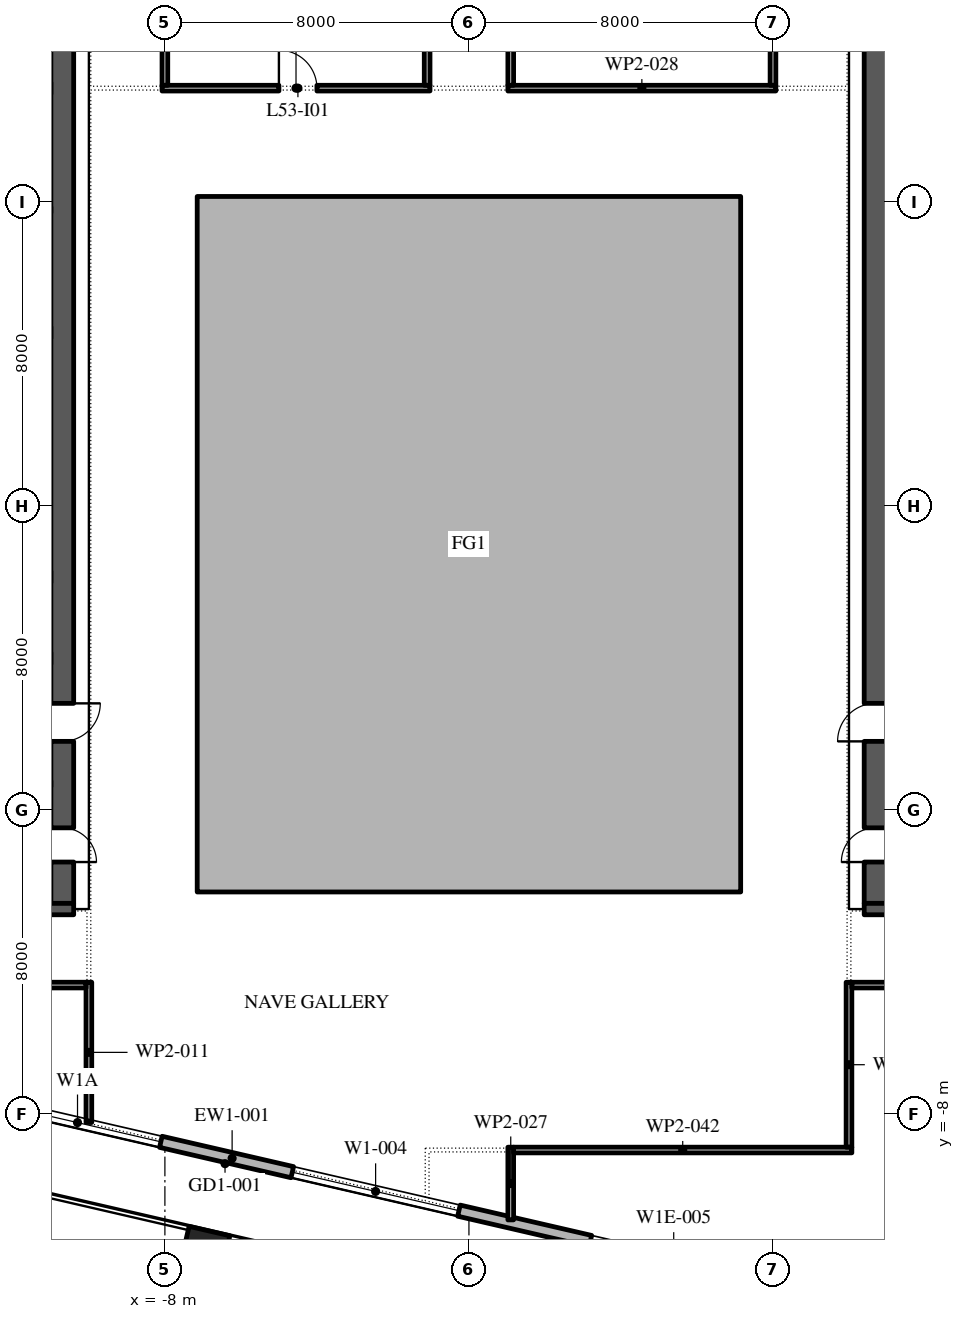
"""IFC4 building model, lengths in metres.
Left out: names, types, materials, properties, quantities, classifications, styles, units other than length and angle.
Written with IfcOpenShell. Run it as: python <this file> out.ifc"""

import sys

from ifc_helpers import new_model, si_unit, direction, frame, frame_2d, origin, origin_2d, place, context, subcontext, project, spatial, polyline, rectangle, outline, extrude, element, fill, save


model = new_model("IFC4")
c1 = context("Model", 3, precision=1e-05, world=origin(), true_north=direction((0.0, 1.0)))
c2 = subcontext(c1, "Body", "Model", "MODEL_VIEW")
j1 = project(units=[si_unit("LENGTHUNIT", "METRE"), si_unit("PLANEANGLEUNIT", "RADIAN")], contexts=[c1])
p1 = place(None, origin())
s1 = spatial("IfcSite", under=j1, at=p1, CompositionType="ELEMENT")
p2 = place(p1, origin())
s2 = spatial("IfcBuilding", under=s1, at=p2, CompositionType="ELEMENT")
p3 = place(p2, frame((0.0, 0.0, 247.2)))
s3 = spatial("IfcBuildingStorey", under=s2, at=p3, CompositionType="ELEMENT", Elevation=247.2)
p4 = place(p3, frame((-6.951, -11.608, 0.0), z_axis=(0.0, 0.0, 1.0), x_axis=(0.974370064785, -0.224951054344, 0.0)))
e1 = element("IfcColumn", 1, at=p4, inside=s3, PredefinedType="COLUMN", context=c2, shape_type="SweptSolid", body=[
    extrude(rectangle(XDim=1.1, YDim=1.1, at=origin_2d()), origin(), (0.0, 0.0, 1.0), 4.2),
])
p5 = place(p3, origin())
e2 = element("IfcWall", 2, at=p5, inside=s3, PredefinedType="STANDARD", context=c2, shape_type="SweptSolid", body=[
    extrude(outline(polyline([(-7.15, -2.15), (7.15, -2.15), (7.15, 16.15), (-7.15, 16.15), (-7.15, -2.15)]), holes=[polyline([(-7.0, -2.0), (-7.0, 16.0), (7.0, 16.0), (7.0, -2.0), (-7.0, -2.0)])]), origin(), (0.0, 0.0, 1.0), 4.0),
])
p6 = place(p3, frame((-29.616, -3.758, 0.0), z_axis=(0.0, 0.0, 1.0), x_axis=(0.974370532314, -0.224949029246, 0.0)))
e3 = element("IfcWall", 3, at=p6, inside=s3, PredefinedType="STANDARD", context=c2, shape_type="SweptSolid", body=[
    extrude(rectangle(XDim=48.0, YDim=0.3, at=frame_2d((24.0, 0.0))), origin(), (0.0, 0.0, 1.0), 4.0),
])
p7 = place(p6, frame((1.625, 0.0, 0.45)))
e4 = element("IfcOpeningElement", 4, at=p7, cuts=e3, PredefinedType="OPENING", context=c2, shape_type="SweptSolid", body=[
    extrude(rectangle(XDim=4.5, YDim=3.05, at=frame_2d((2.25, 1.525))), frame((0.0, 0.16, 0.0), z_axis=(0.0, -1.0, 0.0), x_axis=(1.0, 0.0, 0.0)), (0.0, 0.0, 1.0), 0.32),
])
p8 = place(p6, frame((10.575, 0.0, 0.0)))
e5 = element("IfcOpeningElement", 5, at=p8, cuts=e3, PredefinedType="OPENING", context=c2, shape_type="SweptSolid", body=[
    extrude(rectangle(XDim=2.4, YDim=3.5, at=frame_2d((1.2, 1.75))), frame((0.0, 0.16, 0.0), z_axis=(0.0, -1.0, 0.0), x_axis=(1.0, 0.0, 0.0)), (0.0, 0.0, 1.0), 0.32),
])
p9 = place(p6, frame((17.575, 0.0, 0.45)))
e6 = element("IfcOpeningElement", 6, at=p9, cuts=e3, PredefinedType="OPENING", context=c2, shape_type="SweptSolid", body=[
    extrude(rectangle(XDim=4.5, YDim=3.0, at=frame_2d((2.25, 1.5))), frame((0.0, 0.16, 0.0), z_axis=(0.0, -1.0, 0.0), x_axis=(1.0, 0.0, 0.0)), (0.0, 0.0, 1.0), 0.32),
])
p10 = place(p6, frame((25.625, 0.0, 0.45)))
e7 = element("IfcOpeningElement", 7, at=p10, cuts=e3, PredefinedType="OPENING", context=c2, shape_type="SweptSolid", body=[
    extrude(rectangle(XDim=4.5, YDim=3.05, at=frame_2d((2.25, 1.525))), frame((0.0, 0.16, 0.0), z_axis=(0.0, -1.0, 0.0), x_axis=(1.0, 0.0, 0.0)), (0.0, 0.0, 1.0), 0.32),
])
p11 = place(p6, frame((33.675, 0.0, 0.45)))
e8 = element("IfcOpeningElement", 8, at=p11, cuts=e3, PredefinedType="OPENING", context=c2, shape_type="SweptSolid", body=[
    extrude(rectangle(XDim=4.5, YDim=2.825, at=frame_2d((2.25, 1.413))), frame((0.0, 0.16, 0.0), z_axis=(0.0, -1.0, 0.0), x_axis=(1.0, 0.0, 0.0)), (0.0, 0.0, 1.0), 0.32),
])
p12 = place(p6, frame((42.775, 0.0, 0.0)))
e9 = element("IfcOpeningElement", 9, at=p12, cuts=e3, PredefinedType="OPENING", context=c2, shape_type="SweptSolid", body=[
    extrude(rectangle(XDim=2.4, YDim=3.5, at=frame_2d((1.2, 1.75))), frame((0.0, 0.16, 0.0), z_axis=(0.0, -1.0, 0.0), x_axis=(1.0, 0.0, 0.0)), (0.0, 0.0, 1.0), 0.32),
])
p13 = place(p3, frame((-10.7, -2.45, 0.0), z_axis=(0.0, 0.0, 1.0), x_axis=(0.0, 1.0, 0.0)))
e10 = element("IfcWall", 10, at=p13, inside=s3, PredefinedType="SHEAR", context=c2, shape_type="SweptSolid", body=[
    extrude(rectangle(XDim=27.9, YDim=0.6, at=frame_2d((13.95, 0.0))), origin(), (0.0, 0.0, 1.0), 4.0),
])
p14 = place(p13, frame((23.65, 0.0, 0.0)))
e11 = element("IfcOpeningElement", 11, at=p14, cuts=e10, PredefinedType="OPENING", context=c2, shape_type="SweptSolid", body=[
    extrude(rectangle(XDim=2.4, YDim=2.1, at=frame_2d((1.2, 1.05))), frame((0.0, 0.31, 0.0), z_axis=(0.0, -1.0, 0.0), x_axis=(1.0, 0.0, 0.0)), (0.0, 0.0, 1.0), 0.62),
])
p15 = place(p13, frame((1.087, 0.0, 0.0)))
e12 = element("IfcOpeningElement", 12, at=p15, cuts=e10, PredefinedType="OPENING", context=c2, shape_type="SweptSolid", body=[
    extrude(rectangle(XDim=0.9, YDim=2.1, at=frame_2d((0.45, 1.05))), frame((0.0, 0.31, 0.0), z_axis=(0.0, -1.0, 0.0), x_axis=(1.0, 0.0, 0.0)), (0.0, 0.0, 1.0), 0.62),
])
p16 = place(p13, frame((4.262, 0.0, 0.0)))
e13 = element("IfcOpeningElement", 13, at=p16, cuts=e10, PredefinedType="OPENING", context=c2, shape_type="SweptSolid", body=[
    extrude(rectangle(XDim=1.0, YDim=2.1, at=frame_2d((0.5, 1.05))), frame((0.0, 0.31, 0.0), z_axis=(0.0, -1.0, 0.0), x_axis=(1.0, 0.0, 0.0)), (0.0, 0.0, 1.0), 0.62),
])
p17 = place(p3, frame((-21.6, -2.6, 0.0), z_axis=(0.0, 0.0, 1.0), x_axis=(1.0, 0.0, 0.0)))
e14 = element("IfcWall", 14, at=p17, inside=s3, PredefinedType="SHEAR", context=c2, shape_type="SweptSolid", body=[
    extrude(rectangle(XDim=11.2, YDim=0.3, at=frame_2d((5.6, 0.0))), origin(), (0.0, 0.0, 1.0), 4.0),
])
p18 = place(p3, frame((10.7, -2.45, 0.0), z_axis=(0.0, 0.0, 1.0), x_axis=(0.0, 1.0, 0.0)))
e15 = element("IfcWall", 15, at=p18, inside=s3, PredefinedType="SHEAR", context=c2, shape_type="SweptSolid", body=[
    extrude(rectangle(XDim=27.9, YDim=0.6, at=frame_2d((13.95, 0.0))), origin(), (0.0, 0.0, 1.0), 4.0),
])
p19 = place(p18, frame((23.65, 0.0, 0.0)))
e16 = element("IfcOpeningElement", 16, at=p19, cuts=e15, PredefinedType="OPENING", context=c2, shape_type="SweptSolid", body=[
    extrude(rectangle(XDim=2.4, YDim=2.1, at=frame_2d((1.2, 1.05))), frame((0.0, 0.31, 0.0), z_axis=(0.0, -1.0, 0.0), x_axis=(1.0, 0.0, 0.0)), (0.0, 0.0, 1.0), 0.62),
])
p20 = place(p18, frame((1.087, 0.0, 0.0)))
e17 = element("IfcOpeningElement", 17, at=p20, cuts=e15, PredefinedType="OPENING", context=c2, shape_type="SweptSolid", body=[
    extrude(rectangle(XDim=0.9, YDim=2.1, at=frame_2d((0.45, 1.05))), frame((0.0, 0.31, 0.0), z_axis=(0.0, -1.0, 0.0), x_axis=(1.0, 0.0, 0.0)), (0.0, 0.0, 1.0), 0.62),
])
p21 = place(p18, frame((4.262, 0.0, 0.0)))
e18 = element("IfcOpeningElement", 18, at=p21, cuts=e15, PredefinedType="OPENING", context=c2, shape_type="SweptSolid", body=[
    extrude(rectangle(XDim=1.0, YDim=2.1, at=frame_2d((0.5, 1.05))), frame((0.0, 0.31, 0.0), z_axis=(0.0, -1.0, 0.0), x_axis=(1.0, 0.0, 0.0)), (0.0, 0.0, 1.0), 0.62),
])
p22 = place(p3, frame((10.4, -2.6, 0.0), z_axis=(0.0, 0.0, 1.0), x_axis=(1.0, 0.0, 0.0)))
e19 = element("IfcWall", 19, at=p22, inside=s3, PredefinedType="SHEAR", context=c2, shape_type="SweptSolid", body=[
    extrude(rectangle(XDim=11.2, YDim=0.3, at=frame_2d((5.6, 0.0))), origin(), (0.0, 0.0, 1.0), 4.0),
])
p23 = place(p3, frame((-10.0, -8.216, 0.0), z_axis=(0.0, 0.0, 1.0), x_axis=(0.0, 1.0, 0.0)))
e20 = element("IfcWall", 20, at=p23, inside=s3, PredefinedType="PARTITIONING", context=c2, shape_type="SweptSolid", body=[
    extrude(rectangle(XDim=3.691, YDim=0.15, at=frame_2d((1.846, 0.0))), origin(), (0.0, 0.0, 1.0), 4.0),
])
p24 = place(p3, frame((-10.075, -4.6, 0.0), z_axis=(0.0, 0.0, 1.0), x_axis=(-1.0, 0.0, 0.0)))
e21 = element("IfcWall", 21, at=p24, inside=s3, PredefinedType="PARTITIONING", context=c2, shape_type="SweptSolid", body=[
    extrude(rectangle(XDim=11.86, YDim=0.15, at=frame_2d((5.93, 0.0))), origin(), (0.0, 0.0, 1.0), 4.0),
])
p25 = place(p3, frame((-8.075, 19.0, 0.0), z_axis=(0.0, 0.0, 1.0), x_axis=(1.0, 0.0, 0.0)))
e22 = element("IfcWall", 22, at=p25, inside=s3, PredefinedType="PARTITIONING", context=c2, shape_type="SweptSolid", body=[
    extrude(rectangle(XDim=7.05, YDim=0.15, at=frame_2d((3.525, 0.0))), origin(), (0.0, 0.0, 1.0), 4.0),
])
p26 = place(p25, frame((3.075, 0.0, 0.0)))
e23 = element("IfcOpeningElement", 23, at=p26, cuts=e22, PredefinedType="OPENING", context=c2, shape_type="SweptSolid", body=[
    extrude(rectangle(XDim=1.0, YDim=2.1, at=frame_2d((0.5, 1.05))), frame((0.0, 0.085, 0.0), z_axis=(0.0, -1.0, 0.0), x_axis=(1.0, 0.0, 0.0)), (0.0, 0.0, 1.0), 0.17),
])
p27 = place(p3, frame((-8.0, 25.0, 0.0), z_axis=(0.0, 0.0, 1.0), x_axis=(0.0, -1.0, 0.0)))
e24 = element("IfcWall", 24, at=p27, inside=s3, PredefinedType="PARTITIONING", context=c2, shape_type="SweptSolid", body=[
    extrude(rectangle(XDim=5.925, YDim=0.15, at=frame_2d((2.962, 0.0))), origin(), (0.0, 0.0, 1.0), 4.0),
])
p28 = place(p3, frame((-1.1, 19.075, 0.0), z_axis=(0.0, 0.0, 1.0), x_axis=(0.0, 1.0, 0.0)))
e25 = element("IfcWall", 25, at=p28, inside=s3, PredefinedType="PARTITIONING", context=c2, shape_type="SweptSolid", body=[
    extrude(rectangle(XDim=5.875, YDim=0.15, at=frame_2d((2.938, 0.0))), origin(), (0.0, 0.0, 1.0), 4.0),
])
p29 = place(p3, frame((1.1, -8.865, 0.0), z_axis=(0.0, 0.0, 1.0), x_axis=(0.0, -1.0, 0.0)))
e26 = element("IfcWall", 26, at=p29, inside=s3, PredefinedType="PARTITIONING", context=c2, shape_type="SweptSolid", body=[
    extrude(rectangle(XDim=1.913, YDim=0.15, at=frame_2d((0.957, 0.0))), origin(), (0.0, 0.0, 1.0), 4.0),
])
p30 = place(p3, frame((1.025, 19.0, 0.0), z_axis=(0.0, 0.0, 1.0), x_axis=(1.0, 0.0, 0.0)))
e27 = element("IfcWall", 27, at=p30, inside=s3, PredefinedType="PARTITIONING", context=c2, shape_type="SweptSolid", body=[
    extrude(rectangle(XDim=7.05, YDim=0.15, at=frame_2d((3.525, 0.0))), origin(), (0.0, 0.0, 1.0), 4.0),
])
p31 = place(p3, frame((1.1, 28.05, 0.0), z_axis=(0.0, 0.0, 1.0), x_axis=(0.0, -1.0, 0.0)))
e28 = element("IfcWall", 28, at=p31, inside=s3, PredefinedType="PARTITIONING", context=c2, shape_type="SweptSolid", body=[
    extrude(rectangle(XDim=8.975, YDim=0.15, at=frame_2d((4.488, 0.0))), origin(), (0.0, 0.0, 1.0), 4.0),
])
p32 = place(p3, frame((8.0, 19.075, 0.0), z_axis=(0.0, 0.0, 1.0), x_axis=(0.0, 1.0, 0.0)))
e29 = element("IfcWall", 29, at=p32, inside=s3, PredefinedType="PARTITIONING", context=c2, shape_type="SweptSolid", body=[
    extrude(rectangle(XDim=8.875, YDim=0.15, at=frame_2d((4.438, 0.0))), origin(), (0.0, 0.0, 1.0), 4.0),
])
p33 = place(p32, frame((4.775, 0.0, 0.0)))
e30 = element("IfcOpeningElement", 30, at=p33, cuts=e29, PredefinedType="OPENING", context=c2, shape_type="SweptSolid", body=[
    extrude(rectangle(XDim=1.0, YDim=2.1, at=frame_2d((0.5, 1.05))), frame((0.0, 0.085, 0.0), z_axis=(0.0, -1.0, 0.0), x_axis=(1.0, 0.0, 0.0)), (0.0, 0.0, 1.0), 0.17),
])
p34 = place(p3, frame((10.075, -8.94, 0.0), z_axis=(0.0, 0.0, 1.0), x_axis=(-1.0, 0.0, 0.0)))
e31 = element("IfcWall", 31, at=p34, inside=s3, PredefinedType="PARTITIONING", context=c2, shape_type="SweptSolid", body=[
    extrude(rectangle(XDim=8.9, YDim=0.15, at=frame_2d((4.45, 0.0))), origin(), (0.0, 0.0, 1.0), 4.0),
])
p35 = place(p3, frame((10.0, -4.525, 0.0), z_axis=(0.0, 0.0, 1.0), x_axis=(0.0, -1.0, 0.0)))
e32 = element("IfcWall", 32, at=p35, inside=s3, PredefinedType="PARTITIONING", context=c2, shape_type="SweptSolid", body=[
    extrude(rectangle(XDim=4.34, YDim=0.15, at=frame_2d((2.17, 0.0))), origin(), (0.0, 0.0, 1.0), 4.0),
])
p36 = place(p3, frame((22.922, -4.6, 0.0), z_axis=(0.0, 0.0, 1.0), x_axis=(-1.0, 0.0, 0.0)))
e33 = element("IfcWall", 33, at=p36, inside=s3, PredefinedType="PARTITIONING", context=c2, shape_type="SweptSolid", body=[
    extrude(rectangle(XDim=12.847, YDim=0.15, at=frame_2d((6.424, 0.0))), origin(), (0.0, 0.0, 1.0), 4.0),
])
p37 = place(p36, frame((8.522, 0.0, 0.0)))
e34 = element("IfcOpeningElement", 34, at=p37, cuts=e33, PredefinedType="OPENING", context=c2, shape_type="SweptSolid", body=[
    extrude(rectangle(XDim=1.0, YDim=2.1, at=frame_2d((0.5, 1.05))), frame((0.0, 0.085, 0.0), z_axis=(0.0, -1.0, 0.0), x_axis=(1.0, 0.0, 0.0)), (0.0, 0.0, 1.0), 0.17),
])
p38 = place(p9, origin())
e35 = element("IfcWindow", 35, at=p38, inside=s3, PartitioningType="DOUBLE_PANEL_VERTICAL", PredefinedType="WINDOW", context=c2, shape_type="SweptSolid", body=[
    extrude(rectangle(XDim=4.5, YDim=3.0, at=frame_2d((2.25, 1.5))), frame((0.0, 0.03, 0.0), z_axis=(0.0, -1.0, 0.0), x_axis=(1.0, 0.0, 0.0)), (0.0, 0.0, 1.0), 0.06),
])
fill(e6, e35)
p39 = place(p10, origin())
e36 = element("IfcWindow", 36, at=p39, inside=s3, PartitioningType="DOUBLE_PANEL_VERTICAL", PredefinedType="WINDOW", context=c2, shape_type="SweptSolid", body=[
    extrude(rectangle(XDim=4.5, YDim=3.05, at=frame_2d((2.25, 1.525))), frame((0.0, 0.03, 0.0), z_axis=(0.0, -1.0, 0.0), x_axis=(1.0, 0.0, 0.0)), (0.0, 0.0, 1.0), 0.06),
])
fill(e7, e36)
p40 = place(p26, origin())
e37 = element("IfcDoor", 37, at=p40, inside=s3, OperationType="SINGLE_SWING_RIGHT", PredefinedType="DOOR", context=c2, shape_type="SweptSolid", body=[
    extrude(rectangle(XDim=1.0, YDim=2.1, at=frame_2d((0.5, 1.05))), frame((0.0, 0.025, 0.0), z_axis=(0.0, -1.0, 0.0), x_axis=(1.0, 0.0, 0.0)), (0.0, 0.0, 1.0), 0.05),
])
fill(e23, e37)
save(model, sys.argv[1])
